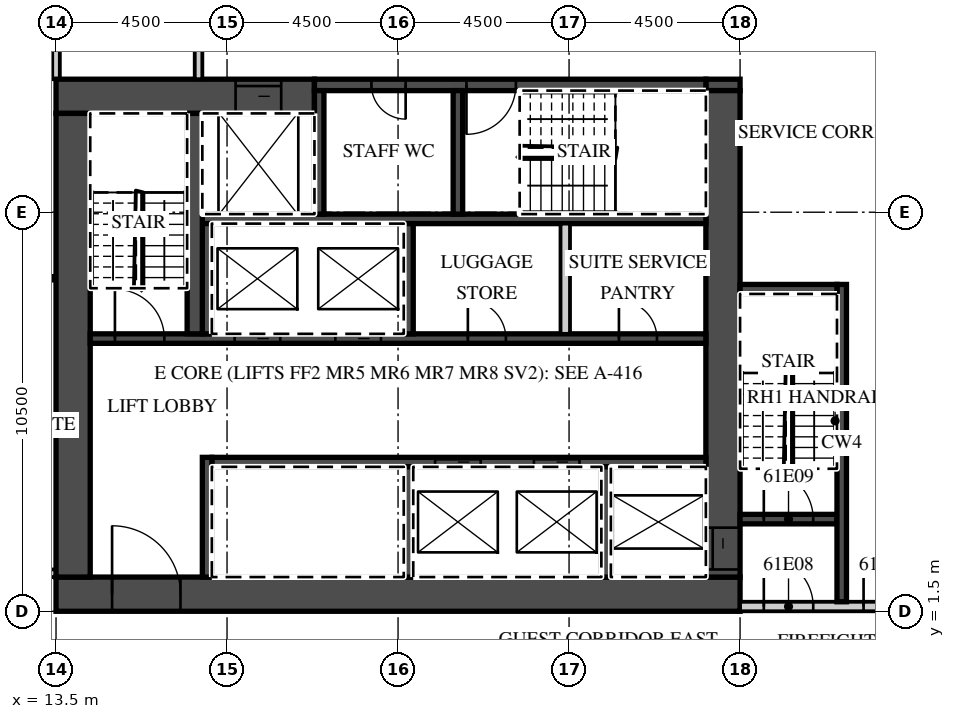
"""IFC4 building model, lengths in metres.
Left out: names, types, materials, properties, quantities, classifications, styles, units other than length and angle.
Written with IfcOpenShell. Run it as: python <this file> out.ifc"""

import sys

from ifc_helpers import new_model, si_unit, direction, frame, frame_2d, origin, place, context, subcontext, project, spatial, rectangle, extrude, element, fill, save


model = new_model("IFC4")
c1 = context("Model", 3, precision=1e-05, world=origin(), true_north=direction((0.0, 1.0)))
c2 = subcontext(c1, "Body", "Model", "MODEL_VIEW")
j1 = project(units=[si_unit("LENGTHUNIT", "METRE"), si_unit("PLANEANGLEUNIT", "RADIAN")], contexts=[c1])
p1 = place(None, origin())
s1 = spatial("IfcSite", under=j1, at=p1, CompositionType="ELEMENT")
p2 = place(p1, origin())
s2 = spatial("IfcBuilding", under=s1, at=p2, CompositionType="ELEMENT")
p3 = place(p2, frame((0.0, 0.0, 247.4)))
s3 = spatial("IfcBuildingStorey", under=s2, at=p3, CompositionType="ELEMENT", Elevation=247.4)
p4 = place(p3, frame((13.5, 15.5, 0.0), z_axis=(0.0, 0.0, 1.0), x_axis=(0.0, 1.0, 0.0)))
e1 = element("IfcWall", 1, at=p4, inside=s3, PredefinedType="PARTITIONING", context=c2, shape_type="SweptSolid", body=[
    extrude(rectangle(XDim=5.436, YDim=0.2, at=frame_2d((2.718, 0.0))), origin(), (0.0, 0.0, 1.0), 3.02),
])
p5 = place(p3, frame((-13.5, 2.5, 0.0), z_axis=(0.0, 0.0, 1.0), x_axis=(1.0, 0.0, 0.0)))
e2 = element("IfcWall", 2, at=p5, inside=s3, PredefinedType="PARTITIONING", context=c2, shape_type="SweptSolid", body=[
    extrude(rectangle(XDim=27.0, YDim=0.2, at=frame_2d((13.5, 0.0))), origin(), (0.0, 0.0, 1.0), 3.02),
])
p6 = place(p5, frame((0.575, 0.0, 0.0)))
e3 = element("IfcOpeningElement", 3, at=p6, cuts=e2, PredefinedType="OPENING", context=c2, shape_type="SweptSolid", body=[
    extrude(rectangle(XDim=1.0, YDim=2.1, at=frame_2d((0.5, 1.05))), frame((0.0, 0.11, 0.0), z_axis=(0.0, -1.0, 0.0), x_axis=(1.0, 0.0, 0.0)), (0.0, 0.0, 1.0), 0.22),
])
p7 = place(p5, frame((6.938, 0.0, 0.0)))
e4 = element("IfcOpeningElement", 4, at=p7, cuts=e2, PredefinedType="OPENING", context=c2, shape_type="SweptSolid", body=[
    extrude(rectangle(XDim=1.2, YDim=2.1, at=frame_2d((0.6, 1.05))), frame((0.0, 0.11, 0.0), z_axis=(0.0, -1.0, 0.0), x_axis=(1.0, 0.0, 0.0)), (0.0, 0.0, 1.0), 0.22),
])
p8 = place(p5, frame((15.938, 0.0, 0.0)))
e5 = element("IfcOpeningElement", 5, at=p8, cuts=e2, PredefinedType="OPENING", context=c2, shape_type="SweptSolid", body=[
    extrude(rectangle(XDim=1.2, YDim=2.1, at=frame_2d((0.6, 1.05))), frame((0.0, 0.11, 0.0), z_axis=(0.0, -1.0, 0.0), x_axis=(1.0, 0.0, 0.0)), (0.0, 0.0, 1.0), 0.22),
])
p9 = place(p5, frame((23.075, 0.0, 0.0)))
e6 = element("IfcOpeningElement", 6, at=p9, cuts=e2, PredefinedType="OPENING", context=c2, shape_type="SweptSolid", body=[
    extrude(rectangle(XDim=1.0, YDim=2.1, at=frame_2d((0.5, 1.05))), frame((0.0, 0.11, 0.0), z_axis=(0.0, -1.0, 0.0), x_axis=(1.0, 0.0, 0.0)), (0.0, 0.0, 1.0), 0.22),
])
p10 = place(p3, frame((13.5, 1.95, 0.0), z_axis=(0.0, 0.0, 1.0), x_axis=(1.0, 0.0, 0.0)))
e7 = element("IfcWall", 7, at=p10, inside=s3, PredefinedType="SHEAR", context=c2, shape_type="SweptSolid", body=[
    extrude(rectangle(XDim=18.0, YDim=0.9, at=frame_2d((9.0, 0.0))), origin(), (0.0, 0.0, 1.0), 3.02),
])
p11 = place(p10, frame((1.475, 0.0, 0.0)))
e8 = element("IfcOpeningElement", 8, at=p11, cuts=e7, PredefinedType="OPENING", context=c2, shape_type="SweptSolid", body=[
    extrude(rectangle(XDim=1.8, YDim=2.1, at=frame_2d((0.9, 1.05))), frame((0.0, 0.46, 0.0), z_axis=(0.0, -1.0, 0.0), x_axis=(1.0, 0.0, 0.0)), (0.0, 0.0, 1.0), 0.92),
])
p12 = place(p3, frame((13.5, 15.05, 0.0), z_axis=(0.0, 0.0, 1.0), x_axis=(1.0, 0.0, 0.0)))
e9 = element("IfcWall", 9, at=p12, inside=s3, PredefinedType="SHEAR", context=c2, shape_type="SweptSolid", body=[
    extrude(rectangle(XDim=6.8, YDim=0.9, at=frame_2d((3.4, 0.0))), origin(), (0.0, 0.0, 1.0), 3.02),
])
p13 = place(p12, frame((4.725, 0.0, 0.0)))
e10 = element("IfcOpeningElement", 10, at=p13, cuts=e9, PredefinedType="OPENING", context=c2, shape_type="SweptSolid", body=[
    extrude(rectangle(XDim=1.2, YDim=2.1, at=frame_2d((0.6, 1.05))), frame((0.0, 0.46, 0.0), z_axis=(0.0, -1.0, 0.0), x_axis=(1.0, 0.0, 0.0)), (0.0, 0.0, 1.0), 0.92),
])
p14 = place(p3, frame((30.6, 15.35, 0.0), z_axis=(0.0, 0.0, 1.0), x_axis=(1.0, 0.0, 0.0)))
e11 = element("IfcWall", 11, at=p14, inside=s3, PredefinedType="SHEAR", context=c2, shape_type="SweptSolid", body=[
    extrude(rectangle(XDim=0.9, YDim=0.3, at=frame_2d((0.45, 0.0))), origin(), (0.0, 0.0, 1.0), 3.02),
])
p15 = place(p3, frame((20.3, 15.35, 0.0), z_axis=(0.0, 0.0, 1.0), x_axis=(1.0, 0.0, 0.0)))
e12 = element("IfcWall", 12, at=p15, inside=s3, PredefinedType="SHEAR", context=c2, shape_type="SweptSolid", body=[
    extrude(rectangle(XDim=10.3, YDim=0.3, at=frame_2d((5.15, 0.0))), origin(), (0.0, 0.0, 1.0), 3.02),
])
p16 = place(p15, frame((4.0, 0.0, 0.0)))
e13 = element("IfcOpeningElement", 13, at=p16, cuts=e12, PredefinedType="OPENING", context=c2, shape_type="SweptSolid", body=[
    extrude(rectangle(XDim=1.3, YDim=2.1, at=frame_2d((0.65, 1.05))), frame((0.0, 0.16, 0.0), z_axis=(0.0, -1.0, 0.0), x_axis=(1.0, 0.0, 0.0)), (0.0, 0.0, 1.0), 0.32),
])
p17 = place(p15, frame((1.5, 0.0, 0.0)))
e14 = element("IfcOpeningElement", 14, at=p17, cuts=e12, PredefinedType="OPENING", context=c2, shape_type="SweptSolid", body=[
    extrude(rectangle(XDim=0.9, YDim=2.1, at=frame_2d((0.45, 1.05))), frame((0.0, 0.16, 0.0), z_axis=(0.0, -1.0, 0.0), x_axis=(1.0, 0.0, 0.0)), (0.0, 0.0, 1.0), 0.32),
])
p18 = place(p3, frame((31.05, 2.4, 0.0), z_axis=(0.0, 0.0, 1.0), x_axis=(0.0, 1.0, 0.0)))
e15 = element("IfcWall", 15, at=p18, inside=s3, PredefinedType="SHEAR", context=c2, shape_type="SweptSolid", body=[
    extrude(rectangle(XDim=12.8, YDim=0.9, at=frame_2d((6.4, 0.0))), origin(), (0.0, 0.0, 1.0), 3.02),
])
p19 = place(p18, frame((0.2, 0.0, 0.0)))
e16 = element("IfcOpeningElement", 16, at=p19, cuts=e15, PredefinedType="OPENING", context=c2, shape_type="SweptSolid", body=[
    extrude(rectangle(XDim=1.1, YDim=2.1, at=frame_2d((0.55, 1.05))), frame((0.0, 0.46, 0.0), z_axis=(0.0, -1.0, 0.0), x_axis=(1.0, 0.0, 0.0)), (0.0, 0.0, 1.0), 0.92),
])
p20 = place(p3, frame((13.95, 2.4, 0.0), z_axis=(0.0, 0.0, 1.0), x_axis=(0.0, 1.0, 0.0)))
e17 = element("IfcWall", 17, at=p20, inside=s3, PredefinedType="SHEAR", context=c2, shape_type="SweptSolid", body=[
    extrude(rectangle(XDim=12.2, YDim=0.9, at=frame_2d((6.1, 0.0))), origin(), (0.0, 0.0, 1.0), 3.02),
])
p21 = place(p3, frame((17.6, 5.425, 0.0), z_axis=(0.0, 0.0, 1.0), x_axis=(1.0, 0.0, 0.0)))
e18 = element("IfcWall", 18, at=p21, inside=s3, PredefinedType="SHEAR", context=c2, shape_type="SweptSolid", body=[
    extrude(rectangle(XDim=13.0, YDim=0.25, at=frame_2d((6.5, 0.0))), origin(), (0.0, 0.0, 1.0), 3.02),
])
p22 = place(p21, frame((8.475, 0.0, 0.0)))
e19 = element("IfcOpeningElement", 19, at=p22, cuts=e18, PredefinedType="OPENING", context=c2, shape_type="SweptSolid", body=[
    extrude(rectangle(XDim=1.2, YDim=2.1, at=frame_2d((0.6, 1.05))), frame((0.0, 0.135, 0.0), z_axis=(0.0, -1.0, 0.0), x_axis=(1.0, 0.0, 0.0)), (0.0, 0.0, 1.0), 0.27),
])
p23 = place(p21, frame((5.875, 0.0, 0.0)))
e20 = element("IfcOpeningElement", 20, at=p23, cuts=e18, PredefinedType="OPENING", context=c2, shape_type="SweptSolid", body=[
    extrude(rectangle(XDim=1.2, YDim=2.1, at=frame_2d((0.6, 1.05))), frame((0.0, 0.135, 0.0), z_axis=(0.0, -1.0, 0.0), x_axis=(1.0, 0.0, 0.0)), (0.0, 0.0, 1.0), 0.27),
])
p24 = place(p3, frame((17.475, 2.4, 0.0), z_axis=(0.0, 0.0, 1.0), x_axis=(0.0, 1.0, 0.0)))
e21 = element("IfcWall", 21, at=p24, inside=s3, PredefinedType="SHEAR", context=c2, shape_type="SweptSolid", body=[
    extrude(rectangle(XDim=3.15, YDim=0.25, at=frame_2d((1.575, 0.0))), origin(), (0.0, 0.0, 1.0), 3.02),
])
for number, where, z_axis, x_axis in (
    (22, (27.975, 2.4, 0.0), (0.0, 0.0, 1.0), (0.0, 1.0, 0.0)),
    (23, (22.775, 2.4, 0.0), (0.0, 0.0, 1.0), (0.0, 1.0, 0.0)),
):
    element("IfcWall", number, at=place(p3, frame(where, z_axis=z_axis, x_axis=x_axis)), inside=s3, PredefinedType="SHEAR", context=c2, shape_type="SweptSolid", body=[
        extrude(rectangle(XDim=2.9, YDim=0.25, at=frame_2d((1.45, 0.0))), origin(), (0.0, 0.0, 1.0), 3.02),
    ])
p25 = place(p3, frame((14.4, 8.675, 0.0), z_axis=(0.0, 0.0, 1.0), x_axis=(1.0, 0.0, 0.0)))
e24 = element("IfcWall", 24, at=p25, inside=s3, PredefinedType="SHEAR", context=c2, shape_type="SweptSolid", body=[
    extrude(rectangle(XDim=16.2, YDim=0.25, at=frame_2d((8.1, 0.0))), origin(), (0.0, 0.0, 1.0), 3.02),
])
p26 = place(p25, frame((6.45, 0.0, 0.0)))
e25 = element("IfcOpeningElement", 25, at=p26, cuts=e24, PredefinedType="OPENING", context=c2, shape_type="SweptSolid", body=[
    extrude(rectangle(XDim=1.2, YDim=2.1, at=frame_2d((0.6, 1.05))), frame((0.0, 0.135, 0.0), z_axis=(0.0, -1.0, 0.0), x_axis=(1.0, 0.0, 0.0)), (0.0, 0.0, 1.0), 0.27),
])
p27 = place(p25, frame((3.8, 0.0, 0.0)))
e26 = element("IfcOpeningElement", 26, at=p27, cuts=e24, PredefinedType="OPENING", context=c2, shape_type="SweptSolid", body=[
    extrude(rectangle(XDim=1.2, YDim=2.1, at=frame_2d((0.6, 1.05))), frame((0.0, 0.135, 0.0), z_axis=(0.0, -1.0, 0.0), x_axis=(1.0, 0.0, 0.0)), (0.0, 0.0, 1.0), 0.27),
])
p28 = place(p25, frame((0.65, 0.0, 0.0)))
e27 = element("IfcOpeningElement", 27, at=p28, cuts=e24, PredefinedType="OPENING", context=c2, shape_type="SweptSolid", body=[
    extrude(rectangle(XDim=1.3, YDim=2.1, at=frame_2d((0.65, 1.05))), frame((0.0, 0.135, 0.0), z_axis=(0.0, -1.0, 0.0), x_axis=(1.0, 0.0, 0.0)), (0.0, 0.0, 1.0), 0.27),
])
p29 = place(p25, frame((13.913, 0.0, 0.0)))
e28 = element("IfcOpeningElement", 28, at=p29, cuts=e24, PredefinedType="OPENING", context=c2, shape_type="SweptSolid", body=[
    extrude(rectangle(XDim=1.0, YDim=2.1, at=frame_2d((0.5, 1.05))), frame((0.0, 0.135, 0.0), z_axis=(0.0, -1.0, 0.0), x_axis=(1.0, 0.0, 0.0)), (0.0, 0.0, 1.0), 0.27),
])
p30 = place(p25, frame((9.938, 0.0, 0.0)))
e29 = element("IfcOpeningElement", 29, at=p30, cuts=e24, PredefinedType="OPENING", context=c2, shape_type="SweptSolid", body=[
    extrude(rectangle(XDim=1.0, YDim=2.1, at=frame_2d((0.5, 1.05))), frame((0.0, 0.135, 0.0), z_axis=(0.0, -1.0, 0.0), x_axis=(1.0, 0.0, 0.0)), (0.0, 0.0, 1.0), 0.27),
])
p31 = place(p3, frame((17.35, 11.825, 0.0), z_axis=(0.0, 0.0, 1.0), x_axis=(1.0, 0.0, 0.0)))
e30 = element("IfcWall", 30, at=p31, inside=s3, PredefinedType="SHEAR", context=c2, shape_type="SweptSolid", body=[
    extrude(rectangle(XDim=13.25, YDim=0.25, at=frame_2d((6.625, 0.0))), origin(), (0.0, 0.0, 1.0), 3.02),
])
for number, where, z_axis, x_axis in (
    (31, (17.475, 8.8, 0.0), (0.0, 0.0, 1.0), (0.0, 1.0, 0.0)),
    (32, (22.775, 8.8, 0.0), (0.0, 0.0, 1.0), (0.0, 1.0, 0.0)),
):
    element("IfcWall", number, at=place(p3, frame(where, z_axis=z_axis, x_axis=x_axis)), inside=s3, PredefinedType="SHEAR", context=c2, shape_type="SweptSolid", body=[
        extrude(rectangle(XDim=2.9, YDim=0.25, at=frame_2d((1.45, 0.0))), origin(), (0.0, 0.0, 1.0), 3.02),
    ])
p32 = place(p3, frame((26.9, 8.8, 0.0), z_axis=(0.0, 0.0, 1.0), x_axis=(0.0, 1.0, 0.0)))
e33 = element("IfcWall", 33, at=p32, inside=s3, PredefinedType="PARTITIONING", context=c2, shape_type="SweptSolid", body=[
    extrude(rectangle(XDim=2.9, YDim=0.25, at=frame_2d((1.45, 0.0))), origin(), (0.0, 0.0, 1.0), 3.02),
])
p33 = place(p3, frame((17.15, 8.8, 0.0), z_axis=(0.0, 0.0, 1.0), x_axis=(0.0, 1.0, 0.0)))
e34 = element("IfcWall", 34, at=p33, inside=s3, PredefinedType="SHEAR", context=c2, shape_type="SweptSolid", body=[
    extrude(rectangle(XDim=5.8, YDim=0.4, at=frame_2d((2.9, 0.0))), origin(), (0.0, 0.0, 1.0), 3.02),
])
for number, where, z_axis, x_axis in (
    (35, (20.425, 11.95, 0.0), (0.0, 0.0, 1.0), (0.0, 1.0, 0.0)),
    (36, (24.075, 11.95, 0.0), (0.0, 0.0, 1.0), (0.0, 1.0, 0.0)),
):
    element("IfcWall", number, at=place(p3, frame(where, z_axis=z_axis, x_axis=x_axis)), inside=s3, PredefinedType="SHEAR", context=c2, shape_type="SweptSolid", body=[
        extrude(rectangle(XDim=3.25, YDim=0.25, at=frame_2d((1.625, 0.0))), origin(), (0.0, 0.0, 1.0), 3.02),
    ])
p34 = place(p3, frame((31.5, 1.625, 0.0), z_axis=(0.0, 0.0, 1.0), x_axis=(1.0, 0.0, 0.0)))
e37 = element("IfcWall", 37, at=p34, inside=s3, PredefinedType="PARTITIONING", context=c2, shape_type="SweptSolid", body=[
    extrude(rectangle(XDim=11.04, YDim=0.25, at=frame_2d((5.52, 0.0))), origin(), (0.0, 0.0, 1.0), 3.02),
])
p35 = place(p34, frame((0.625, 0.0, 0.0)))
e38 = element("IfcOpeningElement", 38, at=p35, cuts=e37, PredefinedType="OPENING", context=c2, shape_type="SweptSolid", body=[
    extrude(rectangle(XDim=1.3, YDim=2.1, at=frame_2d((0.65, 1.05))), frame((0.0, 0.135, 0.0), z_axis=(0.0, -1.0, 0.0), x_axis=(1.0, 0.0, 0.0)), (0.0, 0.0, 1.0), 0.27),
])
p36 = place(p34, frame((3.25, 0.0, 0.0)))
e39 = element("IfcOpeningElement", 39, at=p36, cuts=e37, PredefinedType="OPENING", context=c2, shape_type="SweptSolid", body=[
    extrude(rectangle(XDim=1.1, YDim=2.1, at=frame_2d((0.55, 1.05))), frame((0.0, 0.135, 0.0), z_axis=(0.0, -1.0, 0.0), x_axis=(1.0, 0.0, 0.0)), (0.0, 0.0, 1.0), 0.27),
])
p37 = place(p3, frame((31.5, 3.925, 0.0), z_axis=(0.0, 0.0, 1.0), x_axis=(1.0, 0.0, 0.0)))
e40 = element("IfcWall", 40, at=p37, inside=s3, PredefinedType="SHEAR", context=c2, shape_type="SweptSolid", body=[
    extrude(rectangle(XDim=2.55, YDim=0.25, at=frame_2d((1.275, 0.0))), origin(), (0.0, 0.0, 1.0), 3.02),
])
p38 = place(p37, frame((0.625, 0.0, 0.0)))
e41 = element("IfcOpeningElement", 41, at=p38, cuts=e40, PredefinedType="OPENING", context=c2, shape_type="SweptSolid", body=[
    extrude(rectangle(XDim=1.3, YDim=2.1, at=frame_2d((0.65, 1.05))), frame((0.0, 0.135, 0.0), z_axis=(0.0, -1.0, 0.0), x_axis=(1.0, 0.0, 0.0)), (0.0, 0.0, 1.0), 0.27),
])
p39 = place(p3, frame((34.175, 1.75, 0.0), z_axis=(0.0, 0.0, 1.0), x_axis=(0.0, 1.0, 0.0)))
e42 = element("IfcWall", 42, at=p39, inside=s3, PredefinedType="SHEAR", context=c2, shape_type="SweptSolid", body=[
    extrude(rectangle(XDim=8.35, YDim=0.25, at=frame_2d((4.175, 0.0))), origin(), (0.0, 0.0, 1.0), 3.02),
])
p40 = place(p3, frame((31.5, 9.975, 0.0), z_axis=(0.0, 0.0, 1.0), x_axis=(1.0, 0.0, 0.0)))
e43 = element("IfcWall", 43, at=p40, inside=s3, PredefinedType="SHEAR", context=c2, shape_type="SweptSolid", body=[
    extrude(rectangle(XDim=2.55, YDim=0.25, at=frame_2d((1.275, 0.0))), origin(), (0.0, 0.0, 1.0), 3.02),
])
p41 = place(p3, frame((17.25, 15.5, 0.0), z_axis=(0.0, 0.0, 1.0), x_axis=(0.0, 1.0, 0.0)))
e44 = element("IfcWall", 44, at=p41, inside=s3, PredefinedType="PARTITIONING", context=c2, shape_type="SweptSolid", body=[
    extrude(rectangle(XDim=2.2, YDim=0.2, at=frame_2d((1.1, 0.0))), origin(), (0.0, 0.0, 1.0), 3.02),
])
p42 = place(p26, origin())
e45 = element("IfcDoor", 45, at=p42, inside=s3, OperationType="SLIDING_TO_LEFT", PredefinedType="DOOR", context=c2, shape_type="SweptSolid", body=[
    extrude(rectangle(XDim=1.2, YDim=2.1, at=frame_2d((0.6, 1.05))), frame((0.0, 0.025, 0.0), z_axis=(0.0, -1.0, 0.0), x_axis=(1.0, 0.0, 0.0)), (0.0, 0.0, 1.0), 0.05),
])
fill(e25, e45)
p43 = place(p27, origin())
e46 = element("IfcDoor", 46, at=p43, inside=s3, OperationType="SLIDING_TO_RIGHT", PredefinedType="DOOR", context=c2, shape_type="SweptSolid", body=[
    extrude(rectangle(XDim=1.2, YDim=2.1, at=frame_2d((0.6, 1.05))), frame((0.0, 0.025, 0.0), z_axis=(0.0, -1.0, 0.0), x_axis=(1.0, 0.0, 0.0)), (0.0, 0.0, 1.0), 0.05),
])
fill(e26, e46)
p44 = place(p22, origin())
e47 = element("IfcDoor", 47, at=p44, inside=s3, OperationType="SLIDING_TO_LEFT", PredefinedType="DOOR", context=c2, shape_type="SweptSolid", body=[
    extrude(rectangle(XDim=1.2, YDim=2.1, at=frame_2d((0.6, 1.05))), frame((0.0, 0.025, 0.0), z_axis=(0.0, -1.0, 0.0), x_axis=(1.0, 0.0, 0.0)), (0.0, 0.0, 1.0), 0.05),
])
fill(e19, e47)
p45 = place(p23, origin())
e48 = element("IfcDoor", 48, at=p45, inside=s3, OperationType="SLIDING_TO_RIGHT", PredefinedType="DOOR", context=c2, shape_type="SweptSolid", body=[
    extrude(rectangle(XDim=1.2, YDim=2.1, at=frame_2d((0.6, 1.05))), frame((0.0, 0.025, 0.0), z_axis=(0.0, -1.0, 0.0), x_axis=(1.0, 0.0, 0.0)), (0.0, 0.0, 1.0), 0.05),
])
fill(e20, e48)
p46 = place(p13, origin())
e49 = element("IfcDoor", 49, at=p46, inside=s3, OperationType="SLIDING_TO_LEFT", PredefinedType="DOOR", context=c2, shape_type="SweptSolid", body=[
    extrude(rectangle(XDim=1.2, YDim=2.1, at=frame_2d((0.6, 1.05))), frame((0.0, 0.025, 0.0), z_axis=(0.0, -1.0, 0.0), x_axis=(1.0, 0.0, 0.0)), (0.0, 0.0, 1.0), 0.05),
])
fill(e10, e49)
p47 = place(p19, origin())
e50 = element("IfcDoor", 50, at=p47, inside=s3, OperationType="SLIDING_TO_LEFT", PredefinedType="DOOR", context=c2, shape_type="SweptSolid", body=[
    extrude(rectangle(XDim=1.1, YDim=2.1, at=frame_2d((0.55, 1.05))), frame((0.0, 0.025, 0.0), z_axis=(0.0, -1.0, 0.0), x_axis=(1.0, 0.0, 0.0)), (0.0, 0.0, 1.0), 0.05),
])
fill(e16, e50)
p48 = place(p11, origin())
e51 = element("IfcDoor", 51, at=p48, inside=s3, OperationType="DOUBLE_DOOR_DOUBLE_SWING", PredefinedType="DOOR", context=c2, shape_type="SweptSolid", body=[
    extrude(rectangle(XDim=1.8, YDim=2.1, at=frame_2d((0.9, 1.05))), frame((0.0, 0.025, 0.0), z_axis=(0.0, -1.0, 0.0), x_axis=(1.0, 0.0, 0.0)), (0.0, 0.0, 1.0), 0.05),
])
fill(e8, e51)
p49 = place(p35, origin())
e52 = element("IfcDoor", 52, at=p49, inside=s3, OperationType="SINGLE_SWING_LEFT", PredefinedType="DOOR", context=c2, shape_type="SweptSolid", body=[
    extrude(rectangle(XDim=1.3, YDim=2.1, at=frame_2d((0.65, 1.05))), frame((0.0, 0.025, 0.0), z_axis=(0.0, -1.0, 0.0), x_axis=(1.0, 0.0, 0.0)), (0.0, 0.0, 1.0), 0.05),
])
fill(e38, e52)
p50 = place(p38, origin())
e53 = element("IfcDoor", 53, at=p50, inside=s3, OperationType="SINGLE_SWING_LEFT", PredefinedType="DOOR", context=c2, shape_type="SweptSolid", body=[
    extrude(rectangle(XDim=1.3, YDim=2.1, at=frame_2d((0.65, 1.05))), frame((0.0, 0.025, 0.0), z_axis=(0.0, -1.0, 0.0), x_axis=(1.0, 0.0, 0.0)), (0.0, 0.0, 1.0), 0.05),
])
fill(e41, e53)
p51 = place(p36, origin())
e54 = element("IfcDoor", 54, at=p51, inside=s3, OperationType="SINGLE_SWING_LEFT", PredefinedType="DOOR", context=c2, shape_type="SweptSolid", body=[
    extrude(rectangle(XDim=1.1, YDim=2.1, at=frame_2d((0.55, 1.05))), frame((0.0, 0.025, 0.0), z_axis=(0.0, -1.0, 0.0), x_axis=(1.0, 0.0, 0.0)), (0.0, 0.0, 1.0), 0.05),
])
fill(e39, e54)
p52 = place(p28, origin())
e55 = element("IfcDoor", 55, at=p52, inside=s3, OperationType="SINGLE_SWING_LEFT", PredefinedType="DOOR", context=c2, shape_type="SweptSolid", body=[
    extrude(rectangle(XDim=1.3, YDim=2.1, at=frame_2d((0.65, 1.05))), frame((0.0, 0.025, 0.0), z_axis=(0.0, -1.0, 0.0), x_axis=(1.0, 0.0, 0.0)), (0.0, 0.0, 1.0), 0.05),
])
fill(e27, e55)
p53 = place(p16, origin())
e56 = element("IfcDoor", 56, at=p53, inside=s3, OperationType="SINGLE_SWING_LEFT", PredefinedType="DOOR", context=c2, shape_type="SweptSolid", body=[
    extrude(rectangle(XDim=1.3, YDim=2.1, at=frame_2d((0.65, 1.05))), frame((0.0, 0.025, 0.0), z_axis=(0.0, -1.0, 0.0), x_axis=(1.0, 0.0, 0.0)), (0.0, 0.0, 1.0), 0.05),
])
fill(e13, e56)
p54 = place(p17, origin())
e57 = element("IfcDoor", 57, at=p54, inside=s3, OperationType="SINGLE_SWING_RIGHT", PredefinedType="DOOR", context=c2, shape_type="SweptSolid", body=[
    extrude(rectangle(XDim=0.9, YDim=2.1, at=frame_2d((0.45, 1.05))), frame((0.0, 0.025, 0.0), z_axis=(0.0, -1.0, 0.0), x_axis=(1.0, 0.0, 0.0)), (0.0, 0.0, 1.0), 0.05),
])
fill(e14, e57)
p55 = place(p29, origin())
e58 = element("IfcDoor", 58, at=p55, inside=s3, OperationType="SINGLE_SWING_LEFT", PredefinedType="DOOR", context=c2, shape_type="SweptSolid", body=[
    extrude(rectangle(XDim=1.0, YDim=2.1, at=frame_2d((0.5, 1.05))), frame((0.0, 0.025, 0.0), z_axis=(0.0, -1.0, 0.0), x_axis=(1.0, 0.0, 0.0)), (0.0, 0.0, 1.0), 0.05),
])
fill(e28, e58)
p56 = place(p30, origin())
e59 = element("IfcDoor", 59, at=p56, inside=s3, OperationType="SINGLE_SWING_LEFT", PredefinedType="DOOR", context=c2, shape_type="SweptSolid", body=[
    extrude(rectangle(XDim=1.0, YDim=2.1, at=frame_2d((0.5, 1.05))), frame((0.0, 0.025, 0.0), z_axis=(0.0, -1.0, 0.0), x_axis=(1.0, 0.0, 0.0)), (0.0, 0.0, 1.0), 0.05),
])
fill(e29, e59)
save(model, sys.argv[1])
